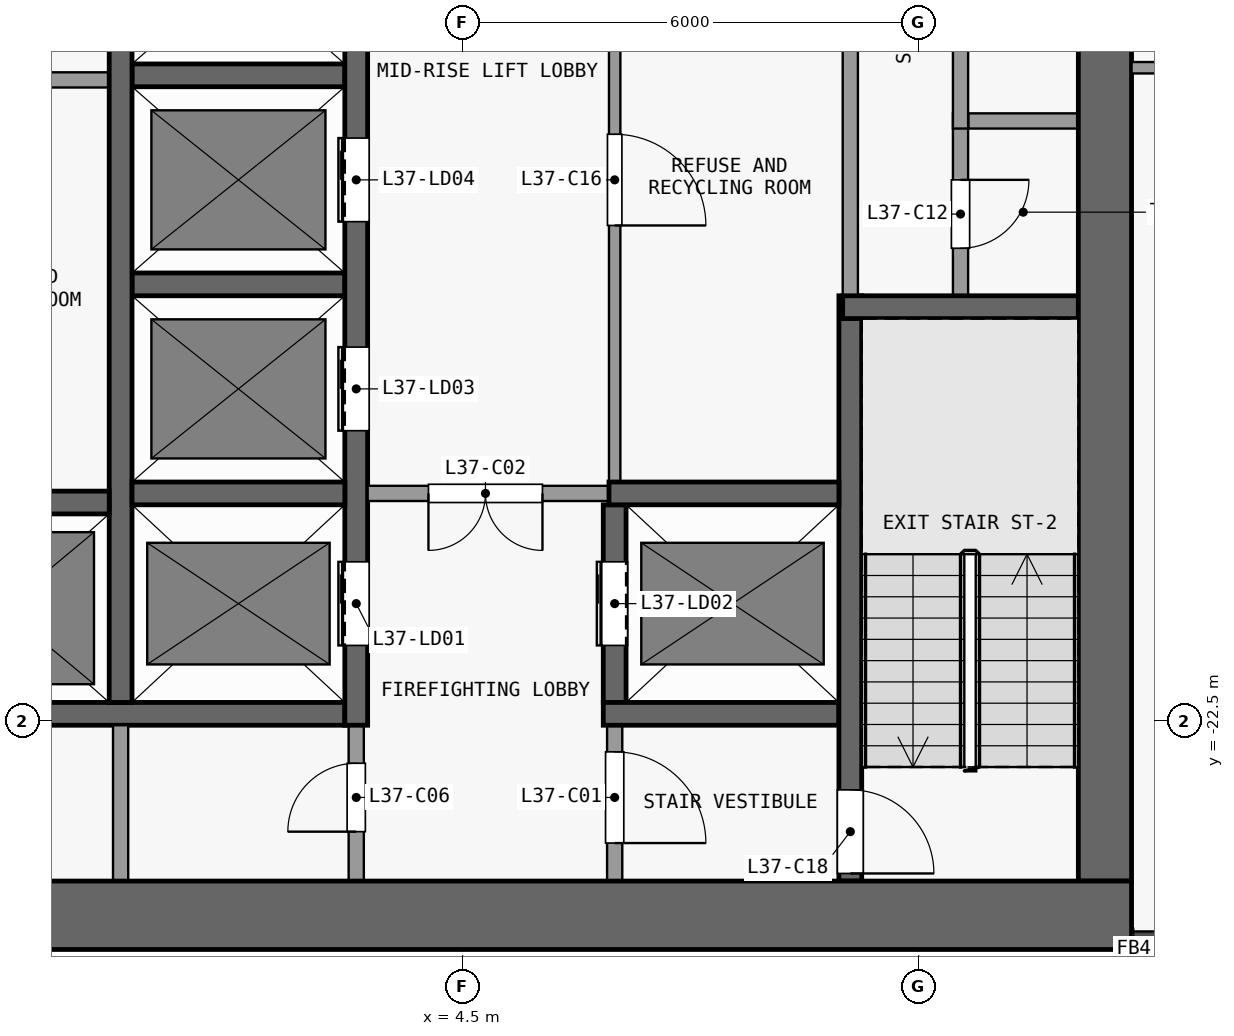
"""IFC4 building model, lengths in metres.
Left out: names, types, materials, properties, quantities, classifications, styles, units other than length and angle.
Written with IfcOpenShell. Run it as: python <this file> out.ifc"""

import sys

from ifc_helpers import new_model, si_unit, direction, frame, frame_2d, origin, place, context, subcontext, project, spatial, rectangle, extrude, element, fill, save


model = new_model("IFC4")
c1 = context("Model", 3, precision=1e-05, world=origin(), true_north=direction((0.0, 1.0)))
c2 = subcontext(c1, "Body", "Model", "MODEL_VIEW")
j1 = project(units=[si_unit("LENGTHUNIT", "METRE"), si_unit("PLANEANGLEUNIT", "RADIAN")], contexts=[c1])
p1 = place(None, origin())
s1 = spatial("IfcSite", under=j1, at=p1, CompositionType="ELEMENT")
p2 = place(p1, origin())
s2 = spatial("IfcBuilding", under=s1, at=p2, CompositionType="ELEMENT")
p3 = place(p2, frame((0.0, 0.0, 152.9)))
s3 = spatial("IfcBuildingStorey", under=s2, at=p3, CompositionType="ELEMENT", Elevation=152.9)
p4 = place(p3, frame((-13.3, -25.05, 0.0), z_axis=(0.0, 0.0, 1.0), x_axis=(1.0, 0.0, 0.0)))
e1 = element("IfcWall", 1, at=p4, inside=s3, PredefinedType="SHEAR", context=c2, shape_type="SweptSolid", body=[
    extrude(rectangle(XDim=26.6, YDim=0.9, at=frame_2d((13.3, 0.0))), origin(), (0.0, 0.0, 1.0), 3.3),
])
p5 = place(p3, frame((12.95, -24.6, 0.0), z_axis=(0.0, 0.0, 1.0), x_axis=(0.0, 1.0, 0.0)))
e2 = element("IfcWall", 2, at=p5, inside=s3, PredefinedType="SHEAR", context=c2, shape_type="SweptSolid", body=[
    extrude(rectangle(XDim=16.1, YDim=0.7, at=frame_2d((8.05, 0.0))), origin(), (0.0, 0.0, 1.0), 3.3),
])
p6 = place(p3, frame((-3.25, -22.4, 0.0), z_axis=(0.0, 0.0, 1.0), x_axis=(1.0, 0.0, 0.0)))
e3 = element("IfcWall", 3, at=p6, inside=s3, PredefinedType="SHEAR", context=c2, shape_type="SweptSolid", body=[
    extrude(rectangle(XDim=6.2, YDim=0.3, at=frame_2d((3.1, 0.0))), origin(), (0.0, 0.0, 1.0), 3.3),
])
p7 = place(p3, frame((6.35, -22.4, 0.0), z_axis=(0.0, 0.0, 1.0), x_axis=(1.0, 0.0, 0.0)))
e4 = element("IfcWall", 4, at=p7, inside=s3, PredefinedType="SHEAR", context=c2, shape_type="SweptSolid", body=[
    extrude(rectangle(XDim=3.1, YDim=0.3, at=frame_2d((1.55, 0.0))), origin(), (0.0, 0.0, 1.0), 3.3),
])
p8 = place(p3, frame((-3.175, -19.62, 0.0), z_axis=(0.0, 0.0, 1.0), x_axis=(1.0, 0.0, 0.0)))
e5 = element("IfcWall", 5, at=p8, inside=s3, PredefinedType="SHEAR", context=c2, shape_type="SweptSolid", body=[
    extrude(rectangle(XDim=3.025, YDim=0.3, at=frame_2d((1.513, 0.0))), origin(), (0.0, 0.0, 1.0), 3.3),
])
p9 = place(p3, frame((0.15, -19.5, 0.0), z_axis=(0.0, 0.0, 1.0), x_axis=(1.0, 0.0, 0.0)))
e6 = element("IfcWall", 6, at=p9, inside=s3, PredefinedType="SHEAR", context=c2, shape_type="SweptSolid", body=[
    extrude(rectangle(XDim=2.8, YDim=0.3, at=frame_2d((1.4, 0.0))), origin(), (0.0, 0.0, 1.0), 3.3),
])
p10 = place(p3, frame((6.575, -19.5, 0.0), z_axis=(0.0, 0.0, 1.0), x_axis=(-1.0, 0.0, 0.0)))
e7 = element("IfcWall", 7, at=p10, inside=s3, PredefinedType="PARTITIONING", context=c2, shape_type="SweptSolid", body=[
    extrude(rectangle(XDim=3.325, YDim=0.2, at=frame_2d((1.663, 0.0))), origin(), (0.0, 0.0, 1.0), 3.3),
])
p11 = place(p10, frame((1.025, 0.0, 0.0)))
e8 = element("IfcOpeningElement", 8, at=p11, cuts=e7, PredefinedType="OPENING", context=c2, shape_type="SweptSolid", body=[
    extrude(rectangle(XDim=1.5, YDim=2.1, at=frame_2d((0.75, 1.05))), frame((0.0, 0.11, 0.0), z_axis=(0.0, -1.0, 0.0), x_axis=(1.0, 0.0, 0.0)), (0.0, 0.0, 1.0), 0.22),
])
p12 = place(p3, frame((6.425, -19.5, 0.0), z_axis=(0.0, 0.0, 1.0), x_axis=(1.0, 0.0, 0.0)))
e9 = element("IfcWall", 9, at=p12, inside=s3, PredefinedType="SHEAR", context=c2, shape_type="SweptSolid", body=[
    extrude(rectangle(XDim=3.025, YDim=0.3, at=frame_2d((1.512, 0.0))), origin(), (0.0, 0.0, 1.0), 3.3),
])
p13 = place(p3, frame((9.5, -17.05, 0.0), z_axis=(0.0, 0.0, 1.0), x_axis=(1.0, 0.0, 0.0)))
e10 = element("IfcWall", 10, at=p13, inside=s3, PredefinedType="SHEAR", context=c2, shape_type="SweptSolid", body=[
    extrude(rectangle(XDim=3.1, YDim=0.3, at=frame_2d((1.55, 0.0))), origin(), (0.0, 0.0, 1.0), 3.3),
])
p14 = place(p3, frame((0.15, -16.75, 0.0), z_axis=(0.0, 0.0, 1.0), x_axis=(1.0, 0.0, 0.0)))
e11 = element("IfcWall", 11, at=p14, inside=s3, PredefinedType="SHEAR", context=c2, shape_type="SweptSolid", body=[
    extrude(rectangle(XDim=2.8, YDim=0.3, at=frame_2d((1.4, 0.0))), origin(), (0.0, 0.0, 1.0), 3.3),
])
p15 = place(p3, frame((11.15, -14.6, 0.0), z_axis=(0.0, 0.0, 1.0), x_axis=(1.0, 0.0, 0.0)))
e12 = element("IfcWall", 12, at=p15, inside=s3, PredefinedType="PARTITIONING", context=c2, shape_type="SweptSolid", body=[
    extrude(rectangle(XDim=1.45, YDim=0.2, at=frame_2d((0.725, 0.0))), origin(), (0.0, 0.0, 1.0), 3.3),
])
p16 = place(p3, frame((-3.0, -14.06, 0.0), z_axis=(0.0, 0.0, 1.0), x_axis=(1.0, 0.0, 0.0)))
e13 = element("IfcWall", 13, at=p16, inside=s3, PredefinedType="PARTITIONING", context=c2, shape_type="SweptSolid", body=[
    extrude(rectangle(XDim=2.85, YDim=0.2, at=frame_2d((1.425, 0.0))), origin(), (0.0, 0.0, 1.0), 3.3),
])
p17 = place(p3, frame((0.15, -14.0, 0.0), z_axis=(0.0, 0.0, 1.0), x_axis=(1.0, 0.0, 0.0)))
e14 = element("IfcWall", 14, at=p17, inside=s3, PredefinedType="SHEAR", context=c2, shape_type="SweptSolid", body=[
    extrude(rectangle(XDim=2.8, YDim=0.3, at=frame_2d((1.4, 0.0))), origin(), (0.0, 0.0, 1.0), 3.3),
])
p18 = place(p3, frame((0.0, -24.6, 0.0), z_axis=(0.0, 0.0, 1.0), x_axis=(0.0, 1.0, 0.0)))
e15 = element("IfcWall", 15, at=p18, inside=s3, PredefinedType="PARTITIONING", context=c2, shape_type="SweptSolid", body=[
    extrude(rectangle(XDim=2.05, YDim=0.2, at=frame_2d((1.025, 0.0))), origin(), (0.0, 0.0, 1.0), 3.3),
])
p19 = place(p3, frame((0.0, -22.25, 0.0), z_axis=(0.0, 0.0, 1.0), x_axis=(0.0, 1.0, 0.0)))
e16 = element("IfcWall", 16, at=p19, inside=s3, PredefinedType="SHEAR", context=c2, shape_type="SweptSolid", body=[
    extrude(rectangle(XDim=13.75, YDim=0.3, at=frame_2d((6.875, 0.0))), origin(), (0.0, 0.0, 1.0), 3.3),
])
p20 = place(p3, frame((3.1, -24.6, 0.0), z_axis=(0.0, 0.0, 1.0), x_axis=(0.0, 1.0, 0.0)))
e17 = element("IfcWall", 17, at=p20, inside=s3, PredefinedType="PARTITIONING", context=c2, shape_type="SweptSolid", body=[
    extrude(rectangle(XDim=2.05, YDim=0.2, at=frame_2d((1.025, 0.0))), origin(), (0.0, 0.0, 1.0), 3.3),
])
p21 = place(p20, frame((0.65, 0.0, 0.0)))
e18 = element("IfcOpeningElement", 18, at=p21, cuts=e17, PredefinedType="OPENING", context=c2, shape_type="SweptSolid", body=[
    extrude(rectangle(XDim=0.9, YDim=2.1, at=frame_2d((0.45, 1.05))), frame((0.0, 0.11, 0.0), z_axis=(0.0, -1.0, 0.0), x_axis=(1.0, 0.0, 0.0)), (0.0, 0.0, 1.0), 0.22),
])
p22 = place(p3, frame((3.1, -22.55, 0.0), z_axis=(0.0, 0.0, 1.0), x_axis=(0.0, 1.0, 0.0)))
e19 = element("IfcWall", 19, at=p22, inside=s3, PredefinedType="SHEAR", context=c2, shape_type="SweptSolid", body=[
    extrude(rectangle(XDim=14.05, YDim=0.3, at=frame_2d((7.025, 0.0))), origin(), (0.0, 0.0, 1.0), 3.3),
])
p23 = place(p22, frame((1.05, 0.0, 0.0)))
e20 = element("IfcOpeningElement", 20, at=p23, cuts=e19, PredefinedType="OPENING", context=c2, shape_type="SweptSolid", body=[
    extrude(rectangle(XDim=1.1, YDim=2.1, at=frame_2d((0.55, 1.05))), frame((0.0, 0.16, 0.0), z_axis=(0.0, -1.0, 0.0), x_axis=(1.0, 0.0, 0.0)), (0.0, 0.0, 1.0), 0.32),
])
p24 = place(p22, frame((3.875, 0.0, 0.0)))
e21 = element("IfcOpeningElement", 21, at=p24, cuts=e19, PredefinedType="OPENING", context=c2, shape_type="SweptSolid", body=[
    extrude(rectangle(XDim=1.1, YDim=2.1, at=frame_2d((0.55, 1.05))), frame((0.0, 0.16, 0.0), z_axis=(0.0, -1.0, 0.0), x_axis=(1.0, 0.0, 0.0)), (0.0, 0.0, 1.0), 0.32),
])
p25 = place(p22, frame((6.625, 0.0, 0.0)))
e22 = element("IfcOpeningElement", 22, at=p25, cuts=e19, PredefinedType="OPENING", context=c2, shape_type="SweptSolid", body=[
    extrude(rectangle(XDim=1.1, YDim=2.1, at=frame_2d((0.55, 1.05))), frame((0.0, 0.16, 0.0), z_axis=(0.0, -1.0, 0.0), x_axis=(1.0, 0.0, 0.0)), (0.0, 0.0, 1.0), 0.32),
])
p26 = place(p22, frame((9.375, 0.0, 0.0)))
e23 = element("IfcOpeningElement", 23, at=p26, cuts=e19, PredefinedType="OPENING", context=c2, shape_type="SweptSolid", body=[
    extrude(rectangle(XDim=1.1, YDim=2.1, at=frame_2d((0.55, 1.05))), frame((0.0, 0.16, 0.0), z_axis=(0.0, -1.0, 0.0), x_axis=(1.0, 0.0, 0.0)), (0.0, 0.0, 1.0), 0.32),
])
p27 = place(p22, frame((12.125, 0.0, 0.0)))
e24 = element("IfcOpeningElement", 24, at=p27, cuts=e19, PredefinedType="OPENING", context=c2, shape_type="SweptSolid", body=[
    extrude(rectangle(XDim=1.1, YDim=2.1, at=frame_2d((0.55, 1.05))), frame((0.0, 0.16, 0.0), z_axis=(0.0, -1.0, 0.0), x_axis=(1.0, 0.0, 0.0)), (0.0, 0.0, 1.0), 0.32),
])
p28 = place(p3, frame((6.5, -22.55, 0.0), z_axis=(0.0, 0.0, 1.0), x_axis=(0.0, -1.0, 0.0)))
e25 = element("IfcWall", 25, at=p28, inside=s3, PredefinedType="PARTITIONING", context=c2, shape_type="SweptSolid", body=[
    extrude(rectangle(XDim=2.05, YDim=0.2, at=frame_2d((1.025, 0.0))), origin(), (0.0, 0.0, 1.0), 3.3),
])
p29 = place(p28, frame((0.35, 0.0, 0.0)))
e26 = element("IfcOpeningElement", 26, at=p29, cuts=e25, PredefinedType="OPENING", context=c2, shape_type="SweptSolid", body=[
    extrude(rectangle(XDim=1.2, YDim=2.1, at=frame_2d((0.6, 1.05))), frame((0.0, 0.11, 0.0), z_axis=(0.0, -1.0, 0.0), x_axis=(1.0, 0.0, 0.0)), (0.0, 0.0, 1.0), 0.22),
])
p30 = place(p3, frame((6.5, -22.25, 0.0), z_axis=(0.0, 0.0, 1.0), x_axis=(0.0, 1.0, 0.0)))
e27 = element("IfcWall", 27, at=p30, inside=s3, PredefinedType="SHEAR", context=c2, shape_type="SweptSolid", body=[
    extrude(rectangle(XDim=2.6, YDim=0.3, at=frame_2d((1.3, 0.0))), origin(), (0.0, 0.0, 1.0), 3.3),
])
p31 = place(p30, frame((0.75, 0.0, 0.0)))
e28 = element("IfcOpeningElement", 28, at=p31, cuts=e27, PredefinedType="OPENING", context=c2, shape_type="SweptSolid", body=[
    extrude(rectangle(XDim=1.1, YDim=2.1, at=frame_2d((0.55, 1.05))), frame((0.0, 0.16, 0.0), z_axis=(0.0, -1.0, 0.0), x_axis=(1.0, 0.0, 0.0)), (0.0, 0.0, 1.0), 0.32),
])
p32 = place(p3, frame((6.5, -11.35, 0.0), z_axis=(0.0, 0.0, 1.0), x_axis=(0.0, -1.0, 0.0)))
e29 = element("IfcWall", 29, at=p32, inside=s3, PredefinedType="PARTITIONING", context=c2, shape_type="SweptSolid", body=[
    extrude(rectangle(XDim=8.0, YDim=0.15, at=frame_2d((4.0, 0.0))), origin(), (0.0, 0.0, 1.0), 3.3),
])
p33 = place(p32, frame((3.425, 0.0, 0.0)))
e30 = element("IfcOpeningElement", 30, at=p33, cuts=e29, PredefinedType="OPENING", context=c2, shape_type="SweptSolid", body=[
    extrude(rectangle(XDim=1.2, YDim=2.1, at=frame_2d((0.6, 1.05))), frame((0.0, 0.085, 0.0), z_axis=(0.0, -1.0, 0.0), x_axis=(1.0, 0.0, 0.0)), (0.0, 0.0, 1.0), 0.17),
])
p34 = place(p3, frame((9.6, -16.9, 0.0), z_axis=(0.0, 0.0, 1.0), x_axis=(0.0, -1.0, 0.0)))
e31 = element("IfcWall", 31, at=p34, inside=s3, PredefinedType="SHEAR", context=c2, shape_type="SweptSolid", body=[
    extrude(rectangle(XDim=7.7, YDim=0.3, at=frame_2d((3.85, 0.0))), origin(), (0.0, 0.0, 1.0), 3.3),
])
p35 = place(p34, frame((6.5, 0.0, 0.0)))
e32 = element("IfcOpeningElement", 32, at=p35, cuts=e31, PredefinedType="OPENING", context=c2, shape_type="SweptSolid", body=[
    extrude(rectangle(XDim=1.1, YDim=2.1, at=frame_2d((0.55, 1.05))), frame((0.0, 0.16, 0.0), z_axis=(0.0, -1.0, 0.0), x_axis=(1.0, 0.0, 0.0)), (0.0, 0.0, 1.0), 0.32),
])
p36 = place(p3, frame((9.6, -16.9, 0.0), z_axis=(0.0, 0.0, 1.0), x_axis=(0.0, 1.0, 0.0)))
e33 = element("IfcWall", 33, at=p36, inside=s3, PredefinedType="PARTITIONING", context=c2, shape_type="SweptSolid", body=[
    extrude(rectangle(XDim=5.75, YDim=0.2, at=frame_2d((2.875, 0.0))), origin(), (0.0, 0.0, 1.0), 3.3),
])
p37 = place(p3, frame((11.05, -14.5, 0.0), z_axis=(0.0, 0.0, 1.0), x_axis=(0.0, -1.0, 0.0)))
e34 = element("IfcWall", 34, at=p37, inside=s3, PredefinedType="PARTITIONING", context=c2, shape_type="SweptSolid", body=[
    extrude(rectangle(XDim=2.4, YDim=0.2, at=frame_2d((1.2, 0.0))), origin(), (0.0, 0.0, 1.0), 3.3),
])
p38 = place(p37, frame((0.875, 0.0, 0.0)))
e35 = element("IfcOpeningElement", 35, at=p38, cuts=e34, PredefinedType="OPENING", context=c2, shape_type="SweptSolid", body=[
    extrude(rectangle(XDim=0.9, YDim=2.1, at=frame_2d((0.45, 1.05))), frame((0.0, 0.11, 0.0), z_axis=(0.0, -1.0, 0.0), x_axis=(1.0, 0.0, 0.0)), (0.0, 0.0, 1.0), 0.22),
])
p39 = place(p3, frame((11.05, -8.5, 0.0), z_axis=(0.0, 0.0, 1.0), x_axis=(0.0, -1.0, 0.0)))
e36 = element("IfcWall", 36, at=p39, inside=s3, PredefinedType="PARTITIONING", context=c2, shape_type="SweptSolid", body=[
    extrude(rectangle(XDim=6.2, YDim=0.2, at=frame_2d((3.1, 0.0))), origin(), (0.0, 0.0, 1.0), 3.3),
])
p40 = place(p39, frame((2.6, 0.0, 0.0)))
e37 = element("IfcOpeningElement", 37, at=p40, cuts=e36, PredefinedType="OPENING", context=c2, shape_type="SweptSolid", body=[
    extrude(rectangle(XDim=0.9, YDim=2.1, at=frame_2d((0.45, 1.05))), frame((0.0, 0.11, 0.0), z_axis=(0.0, -1.0, 0.0), x_axis=(1.0, 0.0, 0.0)), (0.0, 0.0, 1.0), 0.22),
])
p41 = place(p3, frame((13.3, -13.9, 0.0), z_axis=(0.0, 0.0, 1.0), x_axis=(1.0, 0.0, 0.0)))
e38 = element("IfcWall", 38, at=p41, inside=s3, PredefinedType="PARTITIONING", context=c2, shape_type="SweptSolid", body=[
    extrude(rectangle(XDim=5.962, YDim=0.15, at=frame_2d((2.981, 0.0))), origin(), (0.0, 0.0, 1.0), 3.3),
])
p42 = place(p41, frame((4.5, 0.0, 0.0)))
e39 = element("IfcOpeningElement", 39, at=p42, cuts=e38, PredefinedType="OPENING", context=c2, shape_type="SweptSolid", body=[
    extrude(rectangle(XDim=0.9, YDim=2.1, at=frame_2d((0.45, 1.05))), frame((0.0, 0.085, 0.0), z_axis=(0.0, -1.0, 0.0), x_axis=(1.0, 0.0, 0.0)), (0.0, 0.0, 1.0), 0.17),
])
p43 = place(p23, origin())
e40 = element("IfcDoor", 40, at=p43, inside=s3, OperationType="DOUBLE_DOOR_SLIDING", PredefinedType="DOOR", context=c2, shape_type="SweptSolid", body=[
    extrude(rectangle(XDim=1.1, YDim=2.1, at=frame_2d((0.55, 1.05))), frame((0.0, 0.025, 0.0), z_axis=(0.0, -1.0, 0.0), x_axis=(1.0, 0.0, 0.0)), (0.0, 0.0, 1.0), 0.05),
])
fill(e20, e40)
p44 = place(p31, origin())
e41 = element("IfcDoor", 41, at=p44, inside=s3, OperationType="DOUBLE_DOOR_SLIDING", PredefinedType="DOOR", context=c2, shape_type="SweptSolid", body=[
    extrude(rectangle(XDim=1.1, YDim=2.1, at=frame_2d((0.55, 1.05))), frame((0.0, 0.025, 0.0), z_axis=(0.0, -1.0, 0.0), x_axis=(1.0, 0.0, 0.0)), (0.0, 0.0, 1.0), 0.05),
])
fill(e28, e41)
p45 = place(p24, origin())
e42 = element("IfcDoor", 42, at=p45, inside=s3, OperationType="DOUBLE_DOOR_SLIDING", PredefinedType="DOOR", context=c2, shape_type="SweptSolid", body=[
    extrude(rectangle(XDim=1.1, YDim=2.1, at=frame_2d((0.55, 1.05))), frame((0.0, 0.025, 0.0), z_axis=(0.0, -1.0, 0.0), x_axis=(1.0, 0.0, 0.0)), (0.0, 0.0, 1.0), 0.05),
])
fill(e21, e42)
p46 = place(p25, origin())
e43 = element("IfcDoor", 43, at=p46, inside=s3, OperationType="DOUBLE_DOOR_SLIDING", PredefinedType="DOOR", context=c2, shape_type="SweptSolid", body=[
    extrude(rectangle(XDim=1.1, YDim=2.1, at=frame_2d((0.55, 1.05))), frame((0.0, 0.025, 0.0), z_axis=(0.0, -1.0, 0.0), x_axis=(1.0, 0.0, 0.0)), (0.0, 0.0, 1.0), 0.05),
])
fill(e22, e43)
p47 = place(p29, origin())
e44 = element("IfcDoor", 44, at=p47, inside=s3, OperationType="SINGLE_SWING_RIGHT", PredefinedType="DOOR", context=c2, shape_type="SweptSolid", body=[
    extrude(rectangle(XDim=1.2, YDim=2.1, at=frame_2d((0.6, 1.05))), frame((0.0, 0.025, 0.0), z_axis=(0.0, -1.0, 0.0), x_axis=(1.0, 0.0, 0.0)), (0.0, 0.0, 1.0), 0.05),
])
fill(e26, e44)
p48 = place(p11, origin())
e45 = element("IfcDoor", 45, at=p48, inside=s3, OperationType="DOUBLE_DOOR_SINGLE_SWING", PredefinedType="DOOR", context=c2, shape_type="SweptSolid", body=[
    extrude(rectangle(XDim=1.5, YDim=2.1, at=frame_2d((0.75, 1.05))), frame((0.0, 0.025, 0.0), z_axis=(0.0, -1.0, 0.0), x_axis=(1.0, 0.0, 0.0)), (0.0, 0.0, 1.0), 0.05),
])
fill(e8, e45)
p49 = place(p21, origin())
e46 = element("IfcDoor", 46, at=p49, inside=s3, OperationType="SINGLE_SWING_LEFT", PredefinedType="DOOR", context=c2, shape_type="SweptSolid", body=[
    extrude(rectangle(XDim=0.9, YDim=2.1, at=frame_2d((0.45, 1.05))), frame((0.0, 0.025, 0.0), z_axis=(0.0, -1.0, 0.0), x_axis=(1.0, 0.0, 0.0)), (0.0, 0.0, 1.0), 0.05),
])
fill(e18, e46)
p50 = place(p38, origin())
e47 = element("IfcDoor", 47, at=p50, inside=s3, OperationType="SINGLE_SWING_LEFT", PredefinedType="DOOR", context=c2, shape_type="SweptSolid", body=[
    extrude(rectangle(XDim=0.9, YDim=2.1, at=frame_2d((0.45, 1.05))), frame((0.0, 0.025, 0.0), z_axis=(0.0, -1.0, 0.0), x_axis=(1.0, 0.0, 0.0)), (0.0, 0.0, 1.0), 0.05),
])
fill(e35, e47)
p51 = place(p33, origin())
e48 = element("IfcDoor", 48, at=p51, inside=s3, OperationType="SINGLE_SWING_RIGHT", PredefinedType="DOOR", context=c2, shape_type="SweptSolid", body=[
    extrude(rectangle(XDim=1.2, YDim=2.1, at=frame_2d((0.6, 1.05))), frame((0.0, 0.025, 0.0), z_axis=(0.0, -1.0, 0.0), x_axis=(1.0, 0.0, 0.0)), (0.0, 0.0, 1.0), 0.05),
])
fill(e30, e48)
p52 = place(p35, origin())
e49 = element("IfcDoor", 49, at=p52, inside=s3, OperationType="SINGLE_SWING_RIGHT", PredefinedType="DOOR", context=c2, shape_type="SweptSolid", body=[
    extrude(rectangle(XDim=1.1, YDim=2.1, at=frame_2d((0.55, 1.05))), frame((0.0, 0.025, 0.0), z_axis=(0.0, -1.0, 0.0), x_axis=(1.0, 0.0, 0.0)), (0.0, 0.0, 1.0), 0.05),
])
fill(e32, e49)
save(model, sys.argv[1])
